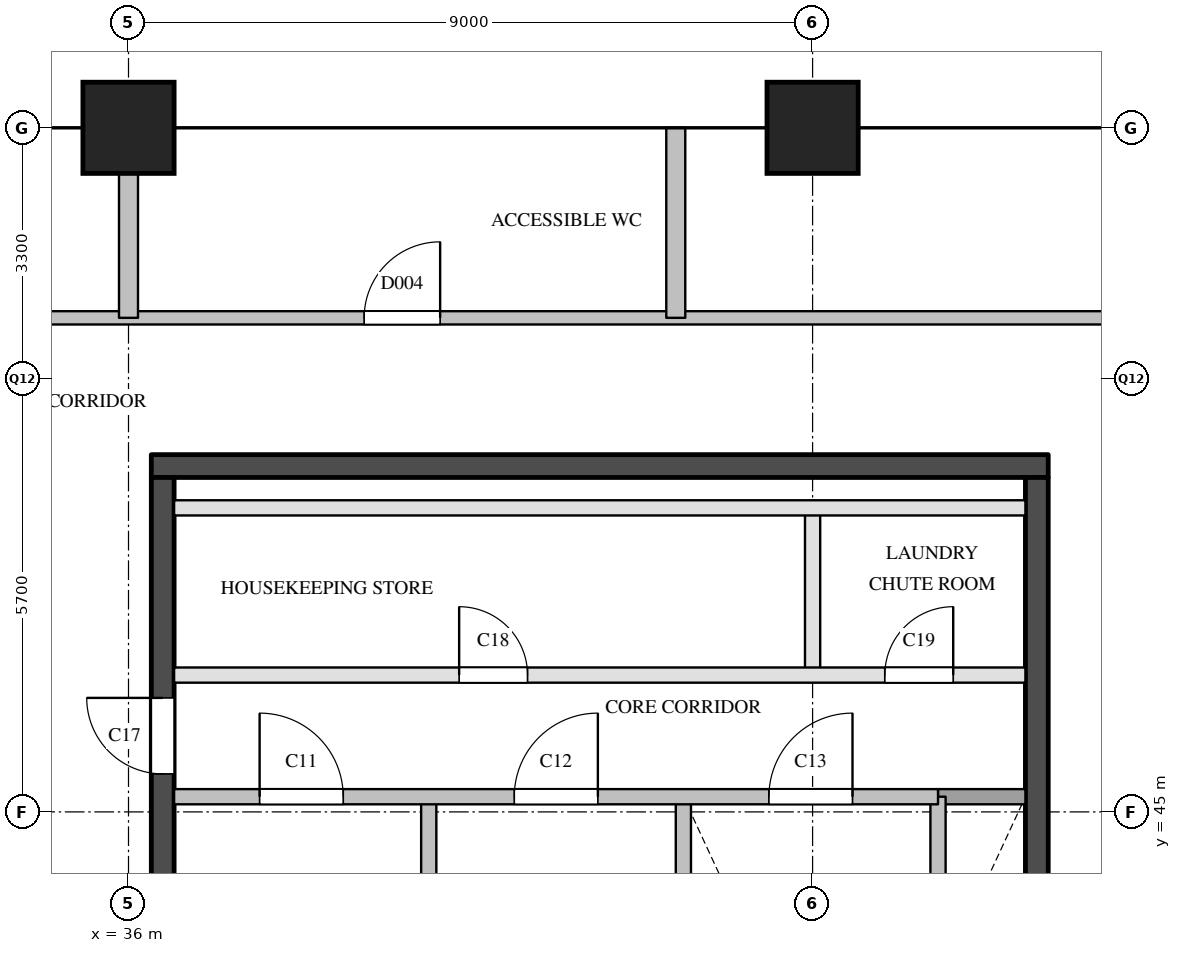
"""IFC4 building model, lengths in metres.
Left out: names, types, materials, properties, quantities, classifications, styles, units other than length and angle.
Written with IfcOpenShell. Run it as: python <this file> out.ifc"""

import sys

from ifc_helpers import new_model, si_unit, direction, frame, frame_2d, origin, origin_2d, place, context, subcontext, project, spatial, rectangle, extrude, element, fill, save


model = new_model("IFC4")
c1 = context("Model", 3, precision=1e-05, world=origin(), true_north=direction((0.0, 1.0)))
c2 = subcontext(c1, "Body", "Model", "MODEL_VIEW")
j1 = project(units=[si_unit("LENGTHUNIT", "METRE"), si_unit("PLANEANGLEUNIT", "RADIAN")], contexts=[c1])
p1 = place(None, origin())
s1 = spatial("IfcSite", under=j1, at=p1, CompositionType="ELEMENT")
p2 = place(p1, origin())
s2 = spatial("IfcBuilding", under=s1, at=p2, CompositionType="ELEMENT")
p3 = place(p2, frame((0.0, 0.0, 312.9)))
s3 = spatial("IfcBuildingStorey", under=s2, at=p3, CompositionType="ELEMENT", Elevation=312.9)
for number, where, z_axis, x_axis in (
    (1, (36.0, 54.0, 0.0), (0.0, 0.0, 1.0), (1.0, 0.0, 0.0)),
    (2, (45.0, 54.0, 0.0), (0.0, 0.0, 1.0), (1.0, 0.0, 0.0)),
):
    element("IfcColumn", number, at=place(p3, frame(where, z_axis=z_axis, x_axis=x_axis)), inside=s3, PredefinedType="COLUMN", context=c2, shape_type="SweptSolid", body=[
        extrude(rectangle(XDim=1.2, YDim=1.2, at=origin_2d()), origin(), (0.0, 0.0, 1.0), 3.9),
    ])
p4 = place(p3, frame((36.3, 49.55, 0.0), z_axis=(0.0, 0.0, 1.0), x_axis=(1.0, 0.0, 0.0)))
e3 = element("IfcWall", 3, at=p4, inside=s3, PredefinedType="SHEAR", context=c2, shape_type="SweptSolid", body=[
    extrude(rectangle(XDim=11.8, YDim=0.3, at=frame_2d((5.9, 0.0))), origin(), (0.0, 0.0, 1.0), 3.6),
])
p5 = place(p3, frame((36.45, 29.1, 0.0), z_axis=(0.0, 0.0, 1.0), x_axis=(0.0, 1.0, 0.0)))
e4 = element("IfcWall", 4, at=p5, inside=s3, PredefinedType="SHEAR", context=c2, shape_type="SweptSolid", body=[
    extrude(rectangle(XDim=20.3, YDim=0.3, at=frame_2d((10.15, 0.0))), origin(), (0.0, 0.0, 1.0), 3.6),
])
p6 = place(p5, frame((3.6, 0.0, 0.0)))
e5 = element("IfcOpeningElement", 5, at=p6, cuts=e4, PredefinedType="OPENING", context=c2, shape_type="SweptSolid", body=[
    extrude(rectangle(XDim=1.8, YDim=2.1, at=frame_2d((0.9, 1.05))), frame((0.0, 0.16, 0.0), z_axis=(0.0, -1.0, 0.0), x_axis=(1.0, 0.0, 0.0)), (0.0, 0.0, 1.0), 0.32),
])
p7 = place(p5, frame((16.4, 0.0, 0.0)))
e6 = element("IfcOpeningElement", 6, at=p7, cuts=e4, PredefinedType="OPENING", context=c2, shape_type="SweptSolid", body=[
    extrude(rectangle(XDim=1.0, YDim=2.1, at=frame_2d((0.5, 1.05))), frame((0.0, 0.16, 0.0), z_axis=(0.0, -1.0, 0.0), x_axis=(1.0, 0.0, 0.0)), (0.0, 0.0, 1.0), 0.32),
])
p8 = place(p3, frame((47.95, 29.1, 0.0), z_axis=(0.0, 0.0, 1.0), x_axis=(0.0, 1.0, 0.0)))
e7 = element("IfcWall", 7, at=p8, inside=s3, PredefinedType="SHEAR", context=c2, shape_type="SweptSolid", body=[
    extrude(rectangle(XDim=20.3, YDim=0.3, at=frame_2d((10.15, 0.0))), origin(), (0.0, 0.0, 1.0), 3.6),
])
p9 = place(p8, frame((12.5, 0.0, 0.0)))
e8 = element("IfcOpeningElement", 8, at=p9, cuts=e7, PredefinedType="OPENING", context=c2, shape_type="SweptSolid", body=[
    extrude(rectangle(XDim=0.7, YDim=2.1, at=frame_2d((0.35, 1.05))), frame((0.0, 0.16, 0.0), z_axis=(0.0, -1.0, 0.0), x_axis=(1.0, 0.0, 0.0)), (0.0, 0.0, 1.0), 0.32),
])
p10 = place(p8, frame((3.9, 0.0, 0.0)))
e9 = element("IfcOpeningElement", 9, at=p10, cuts=e7, PredefinedType="OPENING", context=c2, shape_type="SweptSolid", body=[
    extrude(rectangle(XDim=1.8, YDim=2.1, at=frame_2d((0.9, 1.05))), frame((0.0, 0.16, 0.0), z_axis=(0.0, -1.0, 0.0), x_axis=(1.0, 0.0, 0.0)), (0.0, 0.0, 1.0), 0.32),
])
for number, where, z_axis, x_axis in (
    (10, (39.95, 40.78, 0.0), (0.0, 0.0, 1.0), (0.0, 1.0, 0.0)),
    (11, (43.3, 40.78, 0.0), (0.0, 0.0, 1.0), (0.0, 1.0, 0.0)),
):
    element("IfcWall", number, at=place(p3, frame(where, z_axis=z_axis, x_axis=x_axis)), inside=s3, PredefinedType="SOLIDWALL", context=c2, shape_type="SweptSolid", body=[
        extrude(rectangle(XDim=4.42, YDim=0.2, at=frame_2d((2.21, 0.0))), origin(), (0.0, 0.0, 1.0), 3.6),
    ])
p11 = place(p3, frame((45.0, 46.8, 0.0), z_axis=(0.0, 0.0, 1.0), x_axis=(0.0, 1.0, 0.0)))
e12 = element("IfcWall", 12, at=p11, inside=s3, PredefinedType="PARTITIONING", context=c2, shape_type="SweptSolid", body=[
    extrude(rectangle(XDim=2.2, YDim=0.2, at=frame_2d((1.1, 0.0))), origin(), (0.0, 0.0, 1.0), 3.6),
])
p12 = place(p3, frame((46.65, 40.78, 0.0), z_axis=(0.0, 0.0, 1.0), x_axis=(0.0, 1.0, 0.0)))
e13 = element("IfcWall", 13, at=p12, inside=s3, PredefinedType="SOLIDWALL", context=c2, shape_type="SweptSolid", body=[
    extrude(rectangle(XDim=4.42, YDim=0.2, at=frame_2d((2.21, 0.0))), origin(), (0.0, 0.0, 1.0), 3.6),
])
p13 = place(p3, frame((46.65, 45.2, 0.0), z_axis=(0.0, 0.0, 1.0), x_axis=(1.0, 0.0, 0.0)))
e14 = element("IfcWall", 14, at=p13, inside=s3, PredefinedType="SOLIDWALL", context=c2, shape_type="SweptSolid", body=[
    extrude(rectangle(XDim=1.15, YDim=0.2, at=frame_2d((0.575, 0.0))), origin(), (0.0, 0.0, 1.0), 3.6),
])
p14 = place(p3, frame((36.6, 45.2, 0.0), z_axis=(0.0, 0.0, 1.0), x_axis=(1.0, 0.0, 0.0)))
e15 = element("IfcWall", 15, at=p14, inside=s3, PredefinedType="SOLIDWALL", context=c2, shape_type="SweptSolid", body=[
    extrude(rectangle(XDim=10.05, YDim=0.2, at=frame_2d((5.025, 0.0))), origin(), (0.0, 0.0, 1.0), 3.6),
])
p15 = place(p14, frame((1.125, 0.0, 0.0)))
e16 = element("IfcOpeningElement", 16, at=p15, cuts=e15, PredefinedType="OPENING", context=c2, shape_type="SweptSolid", body=[
    extrude(rectangle(XDim=1.1, YDim=2.1, at=frame_2d((0.55, 1.05))), frame((0.0, 0.11, 0.0), z_axis=(0.0, -1.0, 0.0), x_axis=(1.0, 0.0, 0.0)), (0.0, 0.0, 1.0), 0.22),
])
p16 = place(p14, frame((4.475, 0.0, 0.0)))
e17 = element("IfcOpeningElement", 17, at=p16, cuts=e15, PredefinedType="OPENING", context=c2, shape_type="SweptSolid", body=[
    extrude(rectangle(XDim=1.1, YDim=2.1, at=frame_2d((0.55, 1.05))), frame((0.0, 0.11, 0.0), z_axis=(0.0, -1.0, 0.0), x_axis=(1.0, 0.0, 0.0)), (0.0, 0.0, 1.0), 0.22),
])
p17 = place(p14, frame((7.825, 0.0, 0.0)))
e18 = element("IfcOpeningElement", 18, at=p17, cuts=e15, PredefinedType="OPENING", context=c2, shape_type="SweptSolid", body=[
    extrude(rectangle(XDim=1.1, YDim=2.1, at=frame_2d((0.55, 1.05))), frame((0.0, 0.11, 0.0), z_axis=(0.0, -1.0, 0.0), x_axis=(1.0, 0.0, 0.0)), (0.0, 0.0, 1.0), 0.22),
])
p18 = place(p3, frame((36.6, 46.8, 0.0), z_axis=(0.0, 0.0, 1.0), x_axis=(1.0, 0.0, 0.0)))
e19 = element("IfcWall", 19, at=p18, inside=s3, PredefinedType="PARTITIONING", context=c2, shape_type="SweptSolid", body=[
    extrude(rectangle(XDim=11.2, YDim=0.2, at=frame_2d((5.6, 0.0))), origin(), (0.0, 0.0, 1.0), 3.6),
])
p19 = place(p18, frame((3.75, 0.0, 0.0)))
e20 = element("IfcOpeningElement", 20, at=p19, cuts=e19, PredefinedType="OPENING", context=c2, shape_type="SweptSolid", body=[
    extrude(rectangle(XDim=0.9, YDim=2.1, at=frame_2d((0.45, 1.05))), frame((0.0, 0.11, 0.0), z_axis=(0.0, -1.0, 0.0), x_axis=(1.0, 0.0, 0.0)), (0.0, 0.0, 1.0), 0.22),
])
p20 = place(p18, frame((9.35, 0.0, 0.0)))
e21 = element("IfcOpeningElement", 21, at=p20, cuts=e19, PredefinedType="OPENING", context=c2, shape_type="SweptSolid", body=[
    extrude(rectangle(XDim=0.9, YDim=2.1, at=frame_2d((0.45, 1.05))), frame((0.0, 0.11, 0.0), z_axis=(0.0, -1.0, 0.0), x_axis=(1.0, 0.0, 0.0)), (0.0, 0.0, 1.0), 0.22),
])
p21 = place(p3, frame((36.6, 49.0, 0.0), z_axis=(0.0, 0.0, 1.0), x_axis=(1.0, 0.0, 0.0)))
e22 = element("IfcWall", 22, at=p21, inside=s3, PredefinedType="PARTITIONING", context=c2, shape_type="SweptSolid", body=[
    extrude(rectangle(XDim=11.2, YDim=0.2, at=frame_2d((5.6, 0.0))), origin(), (0.0, 0.0, 1.0), 3.6),
])
p22 = place(p3, frame((34.5, 51.5, 0.0), z_axis=(0.0, 0.0, 1.0), x_axis=(1.0, 0.0, 0.0)))
e23 = element("IfcWall", 23, at=p22, inside=s3, PredefinedType="PARTITIONING", context=c2, shape_type="SweptSolid", body=[
    extrude(rectangle(XDim=15.4, YDim=0.175, at=frame_2d((7.7, 0.0))), origin(), (0.0, 0.0, 1.0), 3.6),
])
p23 = place(p22, frame((4.6, 0.0, 0.0)))
e24 = element("IfcOpeningElement", 24, at=p23, cuts=e23, PredefinedType="OPENING", context=c2, shape_type="SweptSolid", body=[
    extrude(rectangle(XDim=1.0, YDim=2.1, at=frame_2d((0.5, 1.05))), frame((0.0, 0.097, 0.0), z_axis=(0.0, -1.0, 0.0), x_axis=(1.0, 0.0, 0.0)), (0.0, 0.0, 1.0), 0.195),
])
p24 = place(p3, frame((36.0, 51.5, 0.0), z_axis=(0.0, 0.0, 1.0), x_axis=(0.0, 1.0, 0.0)))
e25 = element("IfcWall", 25, at=p24, inside=s3, PredefinedType="PARTITIONING", context=c2, shape_type="SweptSolid", body=[
    extrude(rectangle(XDim=2.5, YDim=0.25, at=frame_2d((1.25, 0.0))), origin(), (0.0, 0.0, 1.0), 3.6),
])
p25 = place(p3, frame((43.2, 51.5, 0.0), z_axis=(0.0, 0.0, 1.0), x_axis=(0.0, 1.0, 0.0)))
e26 = element("IfcWall", 26, at=p25, inside=s3, PredefinedType="PARTITIONING", context=c2, shape_type="SweptSolid", body=[
    extrude(rectangle(XDim=2.5, YDim=0.25, at=frame_2d((1.25, 0.0))), origin(), (0.0, 0.0, 1.0), 2.6),
])
p26 = place(p15, origin())
e27 = element("IfcDoor", 27, at=p26, inside=s3, OperationType="SINGLE_SWING_LEFT", PredefinedType="DOOR", context=c2, shape_type="SweptSolid", body=[
    extrude(rectangle(XDim=1.1, YDim=2.1, at=frame_2d((0.55, 1.05))), frame((0.0, 0.025, 0.0), z_axis=(0.0, -1.0, 0.0), x_axis=(1.0, 0.0, 0.0)), (0.0, 0.0, 1.0), 0.05),
])
fill(e16, e27)
p27 = place(p16, origin())
e28 = element("IfcDoor", 28, at=p27, inside=s3, OperationType="SINGLE_SWING_RIGHT", PredefinedType="DOOR", context=c2, shape_type="SweptSolid", body=[
    extrude(rectangle(XDim=1.1, YDim=2.1, at=frame_2d((0.55, 1.05))), frame((0.0, 0.025, 0.0), z_axis=(0.0, -1.0, 0.0), x_axis=(1.0, 0.0, 0.0)), (0.0, 0.0, 1.0), 0.05),
])
fill(e17, e28)
p28 = place(p17, origin())
e29 = element("IfcDoor", 29, at=p28, inside=s3, OperationType="SINGLE_SWING_RIGHT", PredefinedType="DOOR", context=c2, shape_type="SweptSolid", body=[
    extrude(rectangle(XDim=1.1, YDim=2.1, at=frame_2d((0.55, 1.05))), frame((0.0, 0.025, 0.0), z_axis=(0.0, -1.0, 0.0), x_axis=(1.0, 0.0, 0.0)), (0.0, 0.0, 1.0), 0.05),
])
fill(e18, e29)
p29 = place(p7, origin())
e30 = element("IfcDoor", 30, at=p29, inside=s3, OperationType="SINGLE_SWING_RIGHT", PredefinedType="DOOR", context=c2, shape_type="SweptSolid", body=[
    extrude(rectangle(XDim=1.0, YDim=2.1, at=frame_2d((0.5, 1.05))), frame((0.0, 0.025, 0.0), z_axis=(0.0, -1.0, 0.0), x_axis=(1.0, 0.0, 0.0)), (0.0, 0.0, 1.0), 0.05),
])
fill(e6, e30)
p30 = place(p19, origin())
e31 = element("IfcDoor", 31, at=p30, inside=s3, OperationType="SINGLE_SWING_LEFT", PredefinedType="DOOR", context=c2, shape_type="SweptSolid", body=[
    extrude(rectangle(XDim=0.9, YDim=2.1, at=frame_2d((0.45, 1.05))), frame((0.0, 0.025, 0.0), z_axis=(0.0, -1.0, 0.0), x_axis=(1.0, 0.0, 0.0)), (0.0, 0.0, 1.0), 0.05),
])
fill(e20, e31)
p31 = place(p20, origin())
e32 = element("IfcDoor", 32, at=p31, inside=s3, OperationType="SINGLE_SWING_RIGHT", PredefinedType="DOOR", context=c2, shape_type="SweptSolid", body=[
    extrude(rectangle(XDim=0.9, YDim=2.1, at=frame_2d((0.45, 1.05))), frame((0.0, 0.025, 0.0), z_axis=(0.0, -1.0, 0.0), x_axis=(1.0, 0.0, 0.0)), (0.0, 0.0, 1.0), 0.05),
])
fill(e21, e32)
p32 = place(p23, origin())
e33 = element("IfcDoor", 33, at=p32, inside=s3, OperationType="SINGLE_SWING_RIGHT", PredefinedType="DOOR", context=c2, shape_type="SweptSolid", body=[
    extrude(rectangle(XDim=1.0, YDim=2.1, at=frame_2d((0.5, 1.05))), frame((0.0, 0.025, 0.0), z_axis=(0.0, -1.0, 0.0), x_axis=(1.0, 0.0, 0.0)), (0.0, 0.0, 1.0), 0.05),
])
fill(e24, e33)
save(model, sys.argv[1])
